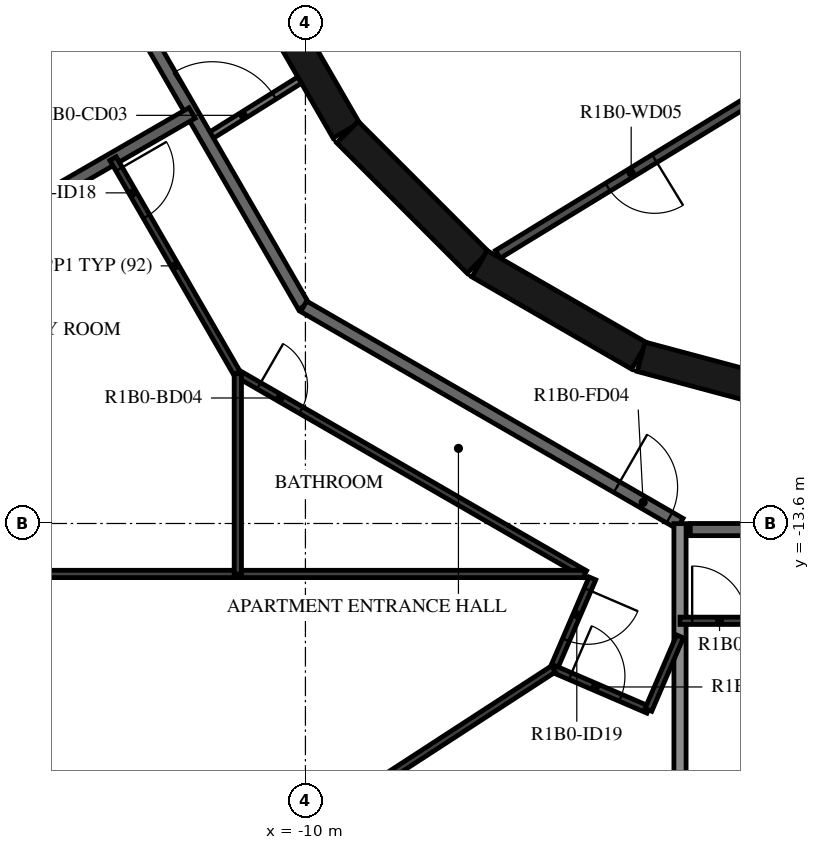
"""IFC4 building model, lengths in metres.
Left out: names, types, materials, properties, quantities, classifications, styles, units other than length and angle.
Written with IfcOpenShell. Run it as: python <this file> out.ifc"""

import sys

from ifc_helpers import new_model, si_unit, direction, frame, frame_2d, origin, place, context, subcontext, project, spatial, rectangle, extrude, element, fill, save


model = new_model("IFC4")
c1 = context("Model", 3, precision=1e-05, world=origin(), true_north=direction((0.0, 1.0)))
c2 = subcontext(c1, "Body", "Model", "MODEL_VIEW")
j1 = project(units=[si_unit("LENGTHUNIT", "METRE"), si_unit("PLANEANGLEUNIT", "RADIAN")], contexts=[c1])
p1 = place(None, origin())
s1 = spatial("IfcSite", under=j1, at=p1, CompositionType="ELEMENT")
p2 = place(p1, origin())
s2 = spatial("IfcBuilding", under=s1, at=p2, CompositionType="ELEMENT")
p3 = place(p2, frame((0.0, 0.0, 52.4)))
s3 = spatial("IfcBuildingStorey", under=s2, at=p3, CompositionType="ELEMENT", Elevation=52.4)
p4 = place(p3, frame((-10.845, -4.51, 0.0), z_axis=(0.0, 0.0, 1.0), x_axis=(0.500087131594, -0.865975092491, 0.0)))
e1 = element("IfcWall", 1, at=p4, inside=s3, PredefinedType="SHEAR", context=c2, shape_type="SweptSolid", body=[
    extrude(rectangle(XDim=3.033, YDim=0.5, at=frame_2d((1.516, 0.0))), origin(), (0.0, 0.0, 1.0), 3.12),
])
p5 = place(p3, frame((-9.308, -7.164, 0.0), z_axis=(0.0, 0.0, 1.0), x_axis=(0.707106781187, -0.707106781187, 0.0)))
e2 = element("IfcWall", 2, at=p5, inside=s3, PredefinedType="SHEAR", context=c2, shape_type="SweptSolid", body=[
    extrude(rectangle(XDim=3.032, YDim=0.5, at=frame_2d((1.516, 0.0))), origin(), (0.0, 0.0, 1.0), 3.12),
])
for number, where, z_axis, x_axis in (
    (3, (-7.137, -9.329, 0.0), (0.0, 0.0, 1.0), (0.866, -0.5, 0.0)),
    (4, (-4.479, -10.858, 0.0), (0.0, 0.0, 1.0), (0.966, -0.259, 0.0)),
):
    element("IfcWall", number, at=place(p3, frame(where, z_axis=z_axis, x_axis=x_axis)), inside=s3, PredefinedType="SHEAR", context=c2, shape_type="SweptSolid", body=[
        extrude(rectangle(XDim=3.033, YDim=0.5, at=frame_2d((1.516, 0.0))), origin(), (0.0, 0.0, 1.0), 3.12),
    ])
p6 = place(p3, frame((-2.451, -6.495, 0.0), z_axis=(0.0, 0.0, 1.0), x_axis=(-0.853250115418, -0.521501908471, 0.0)))
e5 = element("IfcWall", 5, at=p6, inside=s3, PredefinedType="PARTITIONING", context=c2, shape_type="SweptSolid", body=[
    extrude(rectangle(XDim=5.137, YDim=0.15, at=frame_2d((2.569, 0.0))), origin(), (0.0, 0.0, 1.0), 3.12),
])
p7 = place(p6, frame((2.119, 0.0, 0.0)))
e6 = element("IfcOpeningElement", 6, at=p7, cuts=e5, PredefinedType="OPENING", context=c2, shape_type="SweptSolid", body=[
    extrude(rectangle(XDim=0.9, YDim=2.1, at=frame_2d((0.45, 1.05))), frame((0.0, 0.085, 0.0), z_axis=(0.0, -1.0, 0.0), x_axis=(1.0, 0.0, 0.0)), (0.0, 0.0, 1.0), 0.17),
])
p8 = place(p3, frame((-11.625, -7.264, 0.0), z_axis=(0.0, 0.0, 1.0), x_axis=(0.84803632456, 0.529938102259, 0.0)))
e7 = element("IfcWall", 7, at=p8, inside=s3, PredefinedType="PARTITIONING", context=c2, shape_type="SweptSolid", body=[
    extrude(rectangle(XDim=1.804, YDim=0.12, at=frame_2d((0.902, 0.0))), origin(), (0.0, 0.0, 1.0), 3.12),
])
p9 = place(p8, frame((0.11, 0.0, 0.0)))
e8 = element("IfcOpeningElement", 8, at=p9, cuts=e7, PredefinedType="OPENING", context=c2, shape_type="SweptSolid", body=[
    extrude(rectangle(XDim=1.2, YDim=2.1, at=frame_2d((0.6, 1.05))), frame((0.0, 0.07, 0.0), z_axis=(0.0, -1.0, 0.0), x_axis=(1.0, 0.0, 0.0)), (0.0, 0.0, 1.0), 0.14),
])
p10 = place(p3, frame((-13.7, -3.671, 0.0), z_axis=(0.0, 0.0, 1.0), x_axis=(0.500001669485, -0.866024439905, 0.0)))
e9 = element("IfcWall", 9, at=p10, inside=s3, PredefinedType="STANDARD", context=c2, shape_type="SweptSolid", body=[
    extrude(rectangle(XDim=7.342, YDim=0.2, at=frame_2d((3.671, 0.0))), origin(), (0.0, 0.0, 1.0), 3.12),
])
p11 = place(p3, frame((-10.029, -10.029, 0.0), z_axis=(0.0, 0.0, 1.0), x_axis=(0.866022878987, -0.500004373052, 0.0)))
e10 = element("IfcWall", 10, at=p11, inside=s3, PredefinedType="STANDARD", context=c2, shape_type="SweptSolid", body=[
    extrude(rectangle(XDim=7.146, YDim=0.2, at=frame_2d((3.573, 0.0))), origin(), (0.0, 0.0, 1.0), 3.12),
])
p12 = place(p11, frame((5.947, 0.0, 0.0)))
e11 = element("IfcOpeningElement", 11, at=p12, cuts=e10, PredefinedType="OPENING", context=c2, shape_type="SweptSolid", body=[
    extrude(rectangle(XDim=1.0, YDim=2.1, at=frame_2d((0.5, 1.05))), frame((0.0, 0.11, 0.0), z_axis=(0.0, -1.0, 0.0), x_axis=(1.0, 0.0, 0.0)), (0.0, 0.0, 1.0), 0.22),
])
p13 = place(p3, frame((-3.671, -13.7, 0.0), z_axis=(0.0, 0.0, 1.0), x_axis=(1.0, 0.0, 0.0)))
e12 = element("IfcWall", 12, at=p13, inside=s3, PredefinedType="STANDARD", context=c2, shape_type="SweptSolid", body=[
    extrude(rectangle(XDim=7.342, YDim=0.2, at=frame_2d((3.671, 0.0))), origin(), (0.0, 0.0, 1.0), 3.12),
])
p14 = place(p13, frame((2.1, 0.0, 0.0)))
e13 = element("IfcOpeningElement", 13, at=p14, cuts=e12, PredefinedType="OPENING", context=c2, shape_type="SweptSolid", body=[
    extrude(rectangle(XDim=1.0, YDim=2.1, at=frame_2d((0.5, 1.05))), frame((0.0, 0.11, 0.0), z_axis=(0.0, -1.0, 0.0), x_axis=(1.0, 0.0, 0.0)), (0.0, 0.0, 1.0), 0.22),
])
p15 = place(p3, frame((-16.817, -9.709, 0.0), z_axis=(0.0, 0.0, 1.0), x_axis=(0.86604338933, 0.499968846828, 0.0)))
e14 = element("IfcWall", 14, at=p15, inside=s3, PredefinedType="STANDARD", context=c2, shape_type="SweptSolid", body=[
    extrude(rectangle(XDim=5.718, YDim=0.2, at=frame_2d((2.859, 0.0))), origin(), (0.0, 0.0, 1.0), 3.12),
])
p16 = place(p3, frame((-3.84, -19.63, 0.0), z_axis=(0.0, 0.0, 1.0), x_axis=(0.0, 1.0, 0.0)))
e15 = element("IfcWall", 15, at=p16, inside=s3, PredefinedType="STANDARD", context=c2, shape_type="SweptSolid", body=[
    extrude(rectangle(XDim=6.028, YDim=0.2, at=frame_2d((3.014, 0.0))), origin(), (0.0, 0.0, 1.0), 2.73),
])
p17 = place(p3, frame((-13.164, -7.6, 0.0), z_axis=(0.0, 0.0, 1.0), x_axis=(0.500000928893, -0.866024867487, 0.0)))
e16 = element("IfcWall", 16, at=p17, inside=s3, PredefinedType="PARTITIONING", context=c2, shape_type="SweptSolid", body=[
    extrude(rectangle(XDim=4.073, YDim=0.12, at=frame_2d((2.036, 0.0))), origin(), (0.0, 0.0, 1.0), 3.12),
])
p18 = place(p17, frame((0.2, 0.0, 0.0)))
e17 = element("IfcOpeningElement", 17, at=p18, cuts=e16, PredefinedType="OPENING", context=c2, shape_type="SweptSolid", body=[
    extrude(rectangle(XDim=0.9, YDim=2.1, at=frame_2d((0.45, 1.05))), frame((0.0, 0.07, 0.0), z_axis=(0.0, -1.0, 0.0), x_axis=(1.0, 0.0, 0.0)), (0.0, 0.0, 1.0), 0.14),
])
p19 = place(p3, frame((-5.28, -14.503, 0.0), z_axis=(0.0, 0.0, 1.0), x_axis=(-0.395209511122, -0.918591009274, 0.0)))
e18 = element("IfcWall", 18, at=p19, inside=s3, PredefinedType="PARTITIONING", context=c2, shape_type="SweptSolid", body=[
    extrude(rectangle(XDim=1.621, YDim=0.12, at=frame_2d((0.811, 0.0))), origin(), (0.0, 0.0, 1.0), 3.12),
])
p20 = place(p19, frame((0.2, 0.0, 0.0)))
e19 = element("IfcOpeningElement", 19, at=p20, cuts=e18, PredefinedType="OPENING", context=c2, shape_type="SweptSolid", body=[
    extrude(rectangle(XDim=0.9, YDim=2.1, at=frame_2d((0.45, 1.05))), frame((0.0, 0.07, 0.0), z_axis=(0.0, -1.0, 0.0), x_axis=(1.0, 0.0, 0.0)), (0.0, 0.0, 1.0), 0.14),
])
p21 = place(p3, frame((-11.112, -11.136, 0.0), z_axis=(0.0, 0.0, 1.0), x_axis=(0.866017718408, -0.500013311227, 0.0)))
e20 = element("IfcWall", 20, at=p21, inside=s3, PredefinedType="PARTITIONING", context=c2, shape_type="SweptSolid", body=[
    extrude(rectangle(XDim=6.588, YDim=0.12, at=frame_2d((3.294, 0.0))), origin(), (0.0, 0.0, 1.0), 3.12),
])
p22 = place(p21, frame((0.4, 0.0, 0.0)))
e21 = element("IfcOpeningElement", 21, at=p22, cuts=e20, PredefinedType="OPENING", context=c2, shape_type="SweptSolid", body=[
    extrude(rectangle(XDim=0.8, YDim=2.1, at=frame_2d((0.4, 1.05))), frame((0.0, 0.07, 0.0), z_axis=(0.0, -1.0, 0.0), x_axis=(1.0, 0.0, 0.0)), (0.0, 0.0, 1.0), 0.14),
])
p23 = place(p3, frame((-5.921, -15.992, 0.0), z_axis=(0.0, 0.0, 1.0), x_axis=(0.918557080237, -0.395288363536, 0.0)))
e22 = element("IfcWall", 22, at=p23, inside=s3, PredefinedType="PARTITIONING", context=c2, shape_type="SweptSolid", body=[
    extrude(rectangle(XDim=1.7, YDim=0.12, at=frame_2d((0.85, 0.0))), origin(), (0.0, 0.0, 1.0), 3.12),
])
p24 = place(p23, frame((0.3, 0.0, 0.0)))
e23 = element("IfcOpeningElement", 23, at=p24, cuts=e22, PredefinedType="OPENING", context=c2, shape_type="SweptSolid", body=[
    extrude(rectangle(XDim=0.9, YDim=2.1, at=frame_2d((0.45, 1.05))), frame((0.0, 0.07, 0.0), z_axis=(0.0, -1.0, 0.0), x_axis=(1.0, 0.0, 0.0)), (0.0, 0.0, 1.0), 0.14),
])
p25 = place(p3, frame((-4.36, -16.664, 0.0), z_axis=(0.0, 0.0, 1.0), x_axis=(0.395353859705, 0.918528892097, 0.0)))
e24 = element("IfcWall", 24, at=p25, inside=s3, PredefinedType="PARTITIONING", context=c2, shape_type="SweptSolid", body=[
    extrude(rectangle(XDim=1.314, YDim=0.12, at=frame_2d((0.657, 0.0))), origin(), (0.0, 0.0, 1.0), 3.12),
])
p26 = place(p3, frame((-5.407, -14.43, 0.0), z_axis=(0.0, 0.0, 1.0), x_axis=(-1.0, 0.0, 0.0)))
e25 = element("IfcWall", 25, at=p26, inside=s3, PredefinedType="PARTITIONING", context=c2, shape_type="SweptSolid", body=[
    extrude(rectangle(XDim=14.434, YDim=0.12, at=frame_2d((7.217, 0.0))), origin(), (0.0, 0.0, 1.0), 3.12),
])
p27 = place(p26, frame((11.97, 0.0, 0.0)))
e26 = element("IfcOpeningElement", 26, at=p27, cuts=e25, PredefinedType="OPENING", context=c2, shape_type="SweptSolid", body=[
    extrude(rectangle(XDim=0.9, YDim=2.1, at=frame_2d((0.45, 1.05))), frame((0.0, 0.07, 0.0), z_axis=(0.0, -1.0, 0.0), x_axis=(1.0, 0.0, 0.0)), (0.0, 0.0, 1.0), 0.14),
])
p28 = place(p3, frame((-11.112, -14.43, 0.0), z_axis=(0.0, 0.0, 1.0), x_axis=(0.0, 1.0, 0.0)))
e27 = element("IfcWall", 27, at=p28, inside=s3, PredefinedType="PARTITIONING", context=c2, shape_type="SweptSolid", body=[
    extrude(rectangle(XDim=3.294, YDim=0.12, at=frame_2d((1.647, 0.0))), origin(), (0.0, 0.0, 1.0), 3.12),
])
p29 = place(p3, frame((-11.52, -19.63, 0.0), z_axis=(0.0, 0.0, 1.0), x_axis=(0.838545516556, 0.544831548888, 0.0)))
e28 = element("IfcWall", 28, at=p29, inside=s3, PredefinedType="PARTITIONING", context=c2, shape_type="SweptSolid", body=[
    extrude(rectangle(XDim=6.677, YDim=0.12, at=frame_2d((3.339, 0.0))), origin(), (0.0, 0.0, 1.0), 3.12),
])
p30 = place(p3, frame((-3.84, -15.2, 0.0), z_axis=(0.0, 0.0, 1.0), x_axis=(1.0, 0.0, 0.0)))
e29 = element("IfcWall", 29, at=p30, inside=s3, PredefinedType="PARTITIONING", context=c2, shape_type="SweptSolid", body=[
    extrude(rectangle(XDim=4.052, YDim=0.12, at=frame_2d((2.026, 0.0))), origin(), (0.0, 0.0, 1.0), 3.12),
])
p31 = place(p30, frame((0.2, 0.0, 0.0)))
e30 = element("IfcOpeningElement", 30, at=p31, cuts=e29, PredefinedType="OPENING", context=c2, shape_type="SweptSolid", body=[
    extrude(rectangle(XDim=0.9, YDim=2.1, at=frame_2d((0.45, 1.05))), frame((0.0, 0.07, 0.0), z_axis=(0.0, -1.0, 0.0), x_axis=(1.0, 0.0, 0.0)), (0.0, 0.0, 1.0), 0.14),
])
p32 = place(p7, origin())
e31 = element("IfcDoor", 31, at=p32, inside=s3, OperationType="SINGLE_SWING_RIGHT", PredefinedType="DOOR", context=c2, shape_type="SweptSolid", body=[
    extrude(rectangle(XDim=0.9, YDim=2.1, at=frame_2d((0.45, 1.05))), frame((0.0, 0.025, 0.0), z_axis=(0.0, -1.0, 0.0), x_axis=(1.0, 0.0, 0.0)), (0.0, 0.0, 1.0), 0.05),
])
fill(e6, e31)
p33 = place(p12, origin())
e32 = element("IfcDoor", 32, at=p33, inside=s3, OperationType="SINGLE_SWING_LEFT", PredefinedType="DOOR", context=c2, shape_type="SweptSolid", body=[
    extrude(rectangle(XDim=1.0, YDim=2.1, at=frame_2d((0.5, 1.05))), frame((0.0, 0.025, 0.0), z_axis=(0.0, -1.0, 0.0), x_axis=(1.0, 0.0, 0.0)), (0.0, 0.0, 1.0), 0.05),
])
fill(e11, e32)
p34 = place(p18, origin())
e33 = element("IfcDoor", 33, at=p34, inside=s3, OperationType="SINGLE_SWING_LEFT", PredefinedType="DOOR", context=c2, shape_type="SweptSolid", body=[
    extrude(rectangle(XDim=0.9, YDim=2.1, at=frame_2d((0.45, 1.05))), frame((0.0, 0.025, 0.0), z_axis=(0.0, -1.0, 0.0), x_axis=(1.0, 0.0, 0.0)), (0.0, 0.0, 1.0), 0.05),
])
fill(e17, e33)
p35 = place(p20, origin())
e34 = element("IfcDoor", 34, at=p35, inside=s3, OperationType="SINGLE_SWING_RIGHT", PredefinedType="DOOR", context=c2, shape_type="SweptSolid", body=[
    extrude(rectangle(XDim=0.9, YDim=2.1, at=frame_2d((0.45, 1.05))), frame((0.0, 0.025, 0.0), z_axis=(0.0, -1.0, 0.0), x_axis=(1.0, 0.0, 0.0)), (0.0, 0.0, 1.0), 0.05),
])
fill(e19, e34)
p36 = place(p22, origin())
e35 = element("IfcDoor", 35, at=p36, inside=s3, OperationType="SINGLE_SWING_LEFT", PredefinedType="DOOR", context=c2, shape_type="SweptSolid", body=[
    extrude(rectangle(XDim=0.8, YDim=2.1, at=frame_2d((0.4, 1.05))), frame((0.0, 0.025, 0.0), z_axis=(0.0, -1.0, 0.0), x_axis=(1.0, 0.0, 0.0)), (0.0, 0.0, 1.0), 0.05),
])
fill(e21, e35)
p37 = place(p24, origin())
e36 = element("IfcDoor", 36, at=p37, inside=s3, OperationType="SINGLE_SWING_LEFT", PredefinedType="DOOR", context=c2, shape_type="SweptSolid", body=[
    extrude(rectangle(XDim=0.9, YDim=2.1, at=frame_2d((0.45, 1.05))), frame((0.0, 0.025, 0.0), z_axis=(0.0, -1.0, 0.0), x_axis=(1.0, 0.0, 0.0)), (0.0, 0.0, 1.0), 0.05),
])
fill(e23, e36)
p38 = place(p31, origin())
e37 = element("IfcDoor", 37, at=p38, inside=s3, OperationType="SINGLE_SWING_LEFT", PredefinedType="DOOR", context=c2, shape_type="SweptSolid", body=[
    extrude(rectangle(XDim=0.9, YDim=2.1, at=frame_2d((0.45, 1.05))), frame((0.0, 0.025, 0.0), z_axis=(0.0, -1.0, 0.0), x_axis=(1.0, 0.0, 0.0)), (0.0, 0.0, 1.0), 0.05),
])
fill(e30, e37)
p39 = place(p9, origin())
e38 = element("IfcDoor", 38, at=p39, inside=s3, OperationType="DOUBLE_DOOR_SINGLE_SWING", PredefinedType="DOOR", context=c2, shape_type="SweptSolid", body=[
    extrude(rectangle(XDim=1.2, YDim=2.1, at=frame_2d((0.6, 1.05))), frame((0.0, 0.025, 0.0), z_axis=(0.0, -1.0, 0.0), x_axis=(1.0, 0.0, 0.0)), (0.0, 0.0, 1.0), 0.05),
])
fill(e8, e38)
save(model, sys.argv[1])
